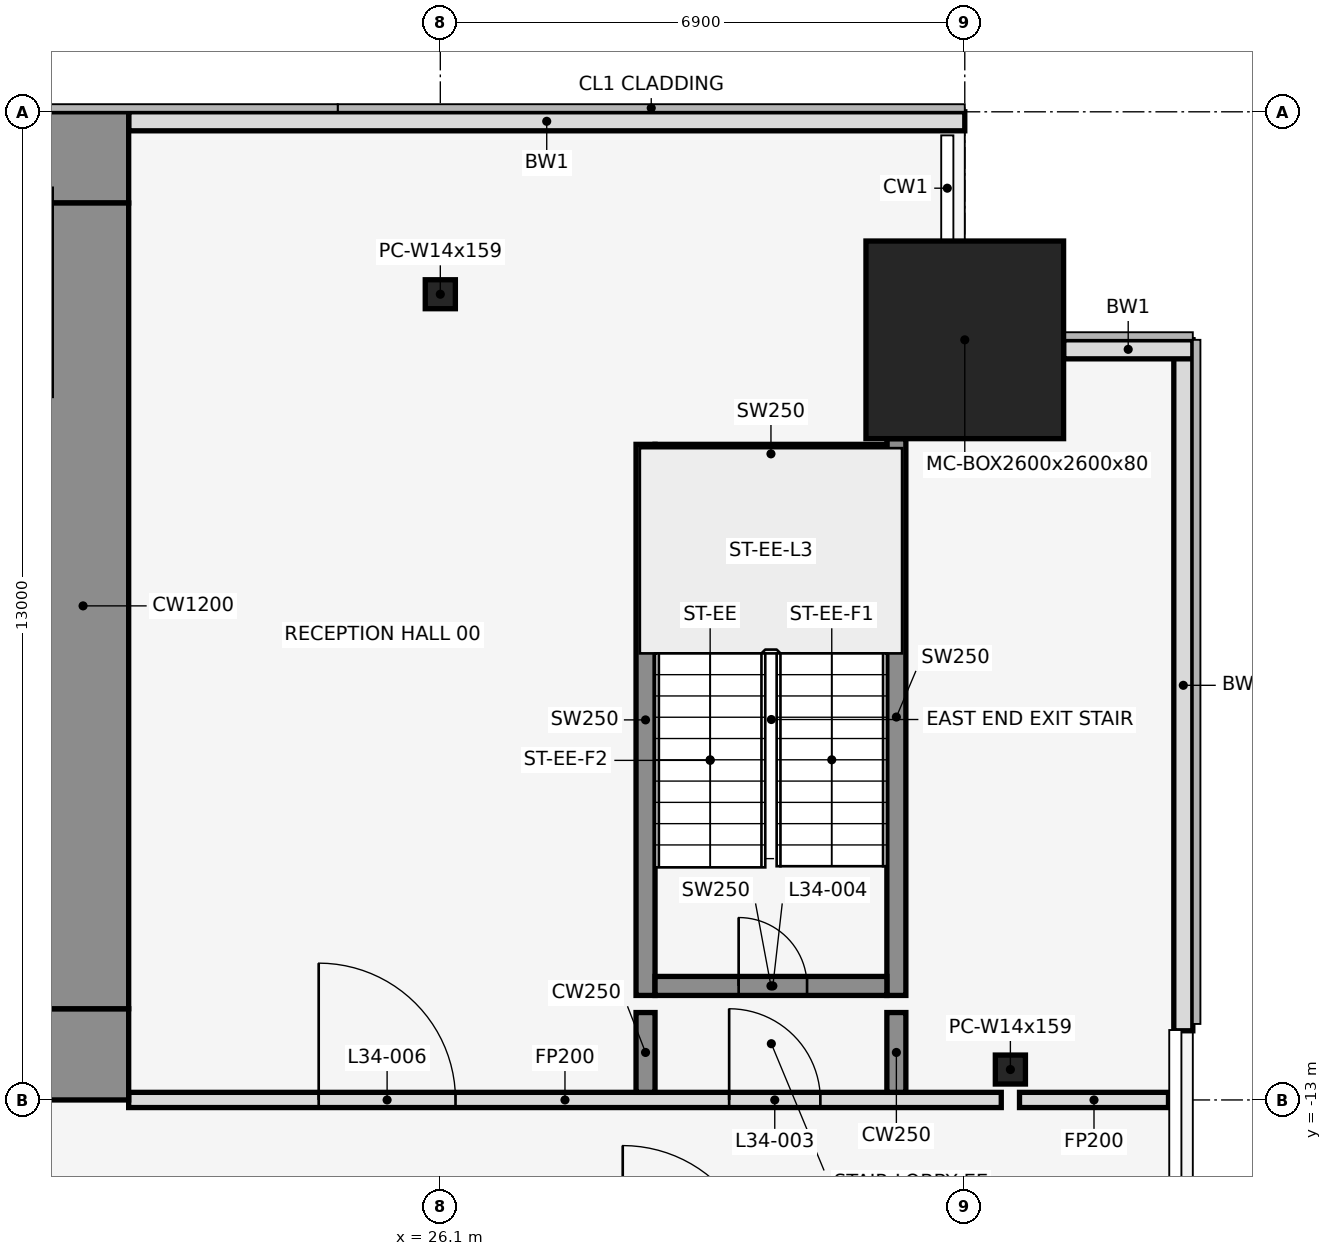
"""IFC4 building model, lengths in metres.
Left out: names, types, materials, properties, quantities, classifications, styles, units other than length and angle.
Written with IfcOpenShell. Run it as: python <this file> out.ifc"""

import sys

from ifc_helpers import new_model, si_unit, direction, frame, frame_2d, origin, origin_2d, place, context, subcontext, project, spatial, rectangle, hollow_rectangle, i_section, extrude, element, fill, save


model = new_model("IFC4")
c1 = context("Model", 3, precision=1e-05, world=origin(), true_north=direction((0.0, 1.0)))
c2 = subcontext(c1, "Body", "Model", "MODEL_VIEW")
j1 = project(units=[si_unit("LENGTHUNIT", "METRE"), si_unit("PLANEANGLEUNIT", "RADIAN")], contexts=[c1])
p1 = place(None, origin())
s1 = spatial("IfcSite", under=j1, at=p1, CompositionType="ELEMENT")
p2 = place(p1, origin())
s2 = spatial("IfcBuilding", under=s1, at=p2, CompositionType="ELEMENT")
p3 = place(p2, frame((0.0, 0.0, 156.8)))
s3 = spatial("IfcBuildingStorey", under=s2, at=p3, CompositionType="ELEMENT", Elevation=156.8)
p4 = place(p3, frame((26.1, -2.4, 0.0), z_axis=(0.0, 0.0, 1.0), x_axis=(1.0, 0.0, 0.0)))
e1 = element("IfcColumn", 1, at=p4, inside=s3, PredefinedType="COLUMN", context=c2, shape_type="SweptSolid", body=[
    extrude(i_section(OverallWidth=0.396, OverallDepth=0.381, WebThickness=0.019, FlangeThickness=0.03, at=origin_2d()), origin(), (0.0, 0.0, 1.0), 4.1),
])
p5 = place(p3, frame((33.0, -3.0, 0.0), z_axis=(0.0, 0.0, 1.0), x_axis=(1.0, 0.0, 0.0)))
e2 = element("IfcColumn", 2, at=p5, inside=s3, PredefinedType="COLUMN", context=c2, shape_type="SweptSolid", body=[
    extrude(hollow_rectangle(XDim=2.6, YDim=2.6, WallThickness=0.08, at=origin_2d()), origin(), (0.0, 0.0, 1.0), 4.1),
])
p6 = place(p3, frame((33.6, -12.6, 0.0), z_axis=(0.0, 0.0, 1.0), x_axis=(1.0, 0.0, 0.0)))
e3 = element("IfcColumn", 3, at=p6, inside=s3, PredefinedType="COLUMN", context=c2, shape_type="SweptSolid", body=[
    extrude(i_section(OverallWidth=0.396, OverallDepth=0.381, WebThickness=0.019, FlangeThickness=0.03, at=origin_2d()), origin(), (0.0, 0.0, 1.0), 4.1),
])
p7 = place(p3, frame((33.0, -0.125, 0.0), z_axis=(0.0, 0.0, 1.0), x_axis=(-1.0, 0.0, 0.0)))
e4 = element("IfcWall", 4, at=p7, inside=s3, PredefinedType="STANDARD", context=c2, shape_type="SweptSolid", body=[
    extrude(rectangle(XDim=11.0, YDim=0.25, at=frame_2d((5.5, 0.0))), origin(), (0.0, 0.0, 1.0), 3.95),
])
p8 = place(p3, frame((35.875, -12.09, 0.0), z_axis=(0.0, 0.0, 1.0), x_axis=(0.0, 1.0, 0.0)))
e5 = element("IfcWall", 5, at=p8, inside=s3, PredefinedType="STANDARD", context=c2, shape_type="SweptSolid", body=[
    extrude(rectangle(XDim=9.09, YDim=0.25, at=frame_2d((4.545, 0.0))), origin(), (0.0, 0.0, 1.0), 3.95),
])
p9 = place(p3, frame((36.0, -3.125, 0.0), z_axis=(0.0, 0.0, 1.0), x_axis=(-1.0, 0.0, 0.0)))
e6 = element("IfcWall", 6, at=p9, inside=s3, PredefinedType="STANDARD", context=c2, shape_type="SweptSolid", body=[
    extrude(rectangle(XDim=1.7, YDim=0.25, at=frame_2d((0.85, 0.0))), origin(), (0.0, 0.0, 1.0), 3.95),
])
p10 = place(p3, frame((28.8, -11.625, 0.0), z_axis=(0.0, 0.0, 1.0), x_axis=(0.0, 1.0, 0.0)))
e7 = element("IfcWall", 7, at=p10, inside=s3, PredefinedType="SHEAR", context=c2, shape_type="SweptSolid", body=[
    extrude(rectangle(XDim=7.25, YDim=0.25, at=frame_2d((3.625, 0.0))), origin(), (0.0, 0.0, 1.0), 4.1),
])
p11 = place(p3, frame((32.1, -11.625, 0.0), z_axis=(0.0, 0.0, 1.0), x_axis=(0.0, 1.0, 0.0)))
e8 = element("IfcWall", 8, at=p11, inside=s3, PredefinedType="SHEAR", context=c2, shape_type="SweptSolid", body=[
    extrude(rectangle(XDim=7.325, YDim=0.25, at=frame_2d((3.663, 0.0))), origin(), (0.0, 0.0, 1.0), 4.1),
])
p12 = place(p3, frame((28.925, -11.5, 0.0), z_axis=(0.0, 0.0, 1.0), x_axis=(1.0, 0.0, 0.0)))
e9 = element("IfcWall", 9, at=p12, inside=s3, PredefinedType="SHEAR", context=c2, shape_type="SweptSolid", body=[
    extrude(rectangle(XDim=3.05, YDim=0.25, at=frame_2d((1.525, 0.0))), origin(), (0.0, 0.0, 1.0), 4.1),
])
p13 = place(p12, frame((1.1, 0.0, 0.0)))
e10 = element("IfcOpeningElement", 10, at=p13, cuts=e9, PredefinedType="OPENING", context=c2, shape_type="SweptSolid", body=[
    extrude(rectangle(XDim=0.9, YDim=2.1, at=frame_2d((0.45, 1.05))), frame((0.0, 0.137, 0.0), z_axis=(0.0, -1.0, 0.0), x_axis=(1.0, 0.0, 0.0)), (0.0, 0.0, 1.0), 0.274),
])
p14 = place(p3, frame((28.925, -4.5, 0.0), z_axis=(0.0, 0.0, 1.0), x_axis=(1.0, 0.0, 0.0)))
e11 = element("IfcWall", 11, at=p14, inside=s3, PredefinedType="SHEAR", context=c2, shape_type="SweptSolid", body=[
    extrude(rectangle(XDim=3.05, YDim=0.25, at=frame_2d((1.525, 0.0))), origin(), (0.0, 0.0, 1.0), 4.1),
])
p15 = place(p3, frame((22.0, -13.0, 0.0), z_axis=(0.0, 0.0, 1.0), x_axis=(1.0, 0.0, 0.0)))
e12 = element("IfcWall", 12, at=p15, inside=s3, PredefinedType="PARTITIONING", context=c2, shape_type="SweptSolid", body=[
    extrude(rectangle(XDim=11.48, YDim=0.2, at=frame_2d((5.74, 0.0))), origin(), (0.0, 0.0, 1.0), 2.84),
])
p16 = place(p15, frame((7.9, 0.0, 0.0)))
e13 = element("IfcOpeningElement", 13, at=p16, cuts=e12, PredefinedType="OPENING", context=c2, shape_type="SweptSolid", body=[
    extrude(rectangle(XDim=1.2, YDim=2.1, at=frame_2d((0.6, 1.05))), frame((0.0, 0.112, 0.0), z_axis=(0.0, -1.0, 0.0), x_axis=(1.0, 0.0, 0.0)), (0.0, 0.0, 1.0), 0.224),
])
p17 = place(p15, frame((2.5, 0.0, 0.0)))
e14 = element("IfcOpeningElement", 14, at=p17, cuts=e12, PredefinedType="OPENING", context=c2, shape_type="SweptSolid", body=[
    extrude(rectangle(XDim=1.8, YDim=2.1, at=frame_2d((0.9, 1.05))), frame((0.0, 0.112, 0.0), z_axis=(0.0, -1.0, 0.0), x_axis=(1.0, 0.0, 0.0)), (0.0, 0.0, 1.0), 0.224),
])
p18 = place(p3, frame((33.72, -13.0, 0.0), z_axis=(0.0, 0.0, 1.0), x_axis=(1.0, 0.0, 0.0)))
e15 = element("IfcWall", 15, at=p18, inside=s3, PredefinedType="PARTITIONING", context=c2, shape_type="SweptSolid", body=[
    extrude(rectangle(XDim=1.96, YDim=0.2, at=frame_2d((0.98, 0.0))), origin(), (0.0, 0.0, 1.0), 2.84),
])
for number, where, z_axis, x_axis in (
    (16, (28.8, -12.9, 0.0), (0.0, 0.0, 1.0), (0.0, 1.0, 0.0)),
    (17, (32.1, -12.9, 0.0), (0.0, 0.0, 1.0), (0.0, 1.0, 0.0)),
):
    element("IfcWall", number, at=place(p3, frame(where, z_axis=z_axis, x_axis=x_axis)), inside=s3, PredefinedType="SHEAR", context=c2, shape_type="SweptSolid", body=[
        extrude(rectangle(XDim=1.05, YDim=0.25, at=frame_2d((0.525, 0.0))), origin(), (0.0, 0.0, 1.0), 4.1),
    ])
p19 = place(p3, frame((-22.0, -0.6, 0.0), z_axis=(0.0, 0.0, 1.0), x_axis=(1.0, 0.0, 0.0)))
e18 = element("IfcWall", 18, at=p19, inside=s3, PredefinedType="SHEAR", context=c2, shape_type="SweptSolid", body=[
    extrude(rectangle(XDim=44.0, YDim=1.2, at=frame_2d((22.0, 0.0))), origin(), (0.0, 0.0, 1.0), 4.1),
])
p20 = place(p19, frame((18.55, 0.0, 0.0)))
e19 = element("IfcOpeningElement", 19, at=p20, cuts=e18, PredefinedType="OPENING", context=c2, shape_type="SweptSolid", body=[
    extrude(rectangle(XDim=0.9, YDim=2.1, at=frame_2d((0.45, 1.05))), frame((0.0, 0.612, 0.0), z_axis=(0.0, -1.0, 0.0), x_axis=(1.0, 0.0, 0.0)), (0.0, 0.0, 1.0), 1.224),
])
p21 = place(p19, frame((24.55, 0.0, 0.0)))
e20 = element("IfcOpeningElement", 20, at=p21, cuts=e18, PredefinedType="OPENING", context=c2, shape_type="SweptSolid", body=[
    extrude(rectangle(XDim=0.9, YDim=2.1, at=frame_2d((0.45, 1.05))), frame((0.0, 0.612, 0.0), z_axis=(0.0, -1.0, 0.0), x_axis=(1.0, 0.0, 0.0)), (0.0, 0.0, 1.0), 1.224),
])
p22 = place(p3, frame((-22.0, -12.4, 0.0), z_axis=(0.0, 0.0, 1.0), x_axis=(1.0, 0.0, 0.0)))
e21 = element("IfcWall", 21, at=p22, inside=s3, PredefinedType="SHEAR", context=c2, shape_type="SweptSolid", body=[
    extrude(rectangle(XDim=44.0, YDim=1.2, at=frame_2d((22.0, 0.0))), origin(), (0.0, 0.0, 1.0), 4.1),
])
p23 = place(p22, frame((2.2, 0.0, 0.0)))
e22 = element("IfcOpeningElement", 22, at=p23, cuts=e21, PredefinedType="OPENING", context=c2, shape_type="SweptSolid", body=[
    extrude(rectangle(XDim=1.2, YDim=2.1, at=frame_2d((0.6, 1.05))), frame((0.0, 0.612, 0.0), z_axis=(0.0, -1.0, 0.0), x_axis=(1.0, 0.0, 0.0)), (0.0, 0.0, 1.0), 1.224),
])
p24 = place(p22, frame((21.4, 0.0, 0.0)))
e23 = element("IfcOpeningElement", 23, at=p24, cuts=e21, PredefinedType="OPENING", context=c2, shape_type="SweptSolid", body=[
    extrude(rectangle(XDim=1.2, YDim=2.1, at=frame_2d((0.6, 1.05))), frame((0.0, 0.612, 0.0), z_axis=(0.0, -1.0, 0.0), x_axis=(1.0, 0.0, 0.0)), (0.0, 0.0, 1.0), 1.224),
])
p25 = place(p22, frame((40.6, 0.0, 0.0)))
e24 = element("IfcOpeningElement", 24, at=p25, cuts=e21, PredefinedType="OPENING", context=c2, shape_type="SweptSolid", body=[
    extrude(rectangle(XDim=1.2, YDim=2.1, at=frame_2d((0.6, 1.05))), frame((0.0, 0.612, 0.0), z_axis=(0.0, -1.0, 0.0), x_axis=(1.0, 0.0, 0.0)), (0.0, 0.0, 1.0), 1.224),
])
p26 = place(p22, frame((16.0, 0.0, 0.0)))
e25 = element("IfcOpeningElement", 25, at=p26, cuts=e21, PredefinedType="OPENING", context=c2, shape_type="SweptSolid", body=[
    extrude(rectangle(XDim=1.8, YDim=2.1, at=frame_2d((0.9, 1.05))), frame((0.0, 0.612, 0.0), z_axis=(0.0, -1.0, 0.0), x_axis=(1.0, 0.0, 0.0)), (0.0, 0.0, 1.0), 1.224),
])
p27 = place(p22, frame((6.3, 0.0, 0.0)))
e26 = element("IfcOpeningElement", 26, at=p27, cuts=e21, PredefinedType="OPENING", context=c2, shape_type="SweptSolid", body=[
    extrude(rectangle(XDim=1.2, YDim=2.1, at=frame_2d((0.6, 1.05))), frame((0.0, 0.612, 0.0), z_axis=(0.0, -1.0, 0.0), x_axis=(1.0, 0.0, 0.0)), (0.0, 0.0, 1.0), 1.224),
])
p28 = place(p22, frame((26.2, 0.0, 0.0)))
e27 = element("IfcOpeningElement", 27, at=p28, cuts=e21, PredefinedType="OPENING", context=c2, shape_type="SweptSolid", body=[
    extrude(rectangle(XDim=1.8, YDim=2.1, at=frame_2d((0.9, 1.05))), frame((0.0, 0.612, 0.0), z_axis=(0.0, -1.0, 0.0), x_axis=(1.0, 0.0, 0.0)), (0.0, 0.0, 1.0), 1.224),
])
p29 = place(p22, frame((36.5, 0.0, 0.0)))
e28 = element("IfcOpeningElement", 28, at=p29, cuts=e21, PredefinedType="OPENING", context=c2, shape_type="SweptSolid", body=[
    extrude(rectangle(XDim=1.2, YDim=2.1, at=frame_2d((0.6, 1.05))), frame((0.0, 0.612, 0.0), z_axis=(0.0, -1.0, 0.0), x_axis=(1.0, 0.0, 0.0)), (0.0, 0.0, 1.0), 1.224),
])
p30 = place(p3, frame((21.4, -11.8, 0.0), z_axis=(0.0, 0.0, 1.0), x_axis=(0.0, 1.0, 0.0)))
e29 = element("IfcWall", 29, at=p30, inside=s3, PredefinedType="SHEAR", context=c2, shape_type="SweptSolid", body=[
    extrude(rectangle(XDim=10.6, YDim=1.2, at=frame_2d((5.3, 0.0))), origin(), (0.0, 0.0, 1.0), 4.1),
])
p31 = place(p16, origin())
e30 = element("IfcDoor", 30, at=p31, inside=s3, OperationType="SINGLE_SWING_RIGHT", PredefinedType="DOOR", context=c2, shape_type="SweptSolid", body=[
    extrude(rectangle(XDim=1.2, YDim=2.1, at=frame_2d((0.6, 1.05))), frame((0.0, 0.025, 0.0), z_axis=(0.0, -1.0, 0.0), x_axis=(1.0, 0.0, 0.0)), (0.0, 0.0, 1.0), 0.05),
])
fill(e13, e30)
p32 = place(p13, origin())
e31 = element("IfcDoor", 31, at=p32, inside=s3, OperationType="SINGLE_SWING_LEFT", PredefinedType="DOOR", context=c2, shape_type="SweptSolid", body=[
    extrude(rectangle(XDim=0.9, YDim=2.1, at=frame_2d((0.45, 1.05))), frame((0.0, 0.025, 0.0), z_axis=(0.0, -1.0, 0.0), x_axis=(1.0, 0.0, 0.0)), (0.0, 0.0, 1.0), 0.05),
])
fill(e10, e31)
p33 = place(p17, origin())
e32 = element("IfcDoor", 32, at=p33, inside=s3, OperationType="SINGLE_SWING_LEFT", PredefinedType="DOOR", context=c2, shape_type="SweptSolid", body=[
    extrude(rectangle(XDim=1.8, YDim=2.1, at=frame_2d((0.9, 1.05))), frame((0.0, 0.025, 0.0), z_axis=(0.0, -1.0, 0.0), x_axis=(1.0, 0.0, 0.0)), (0.0, 0.0, 1.0), 0.05),
])
fill(e14, e32)
save(model, sys.argv[1])
